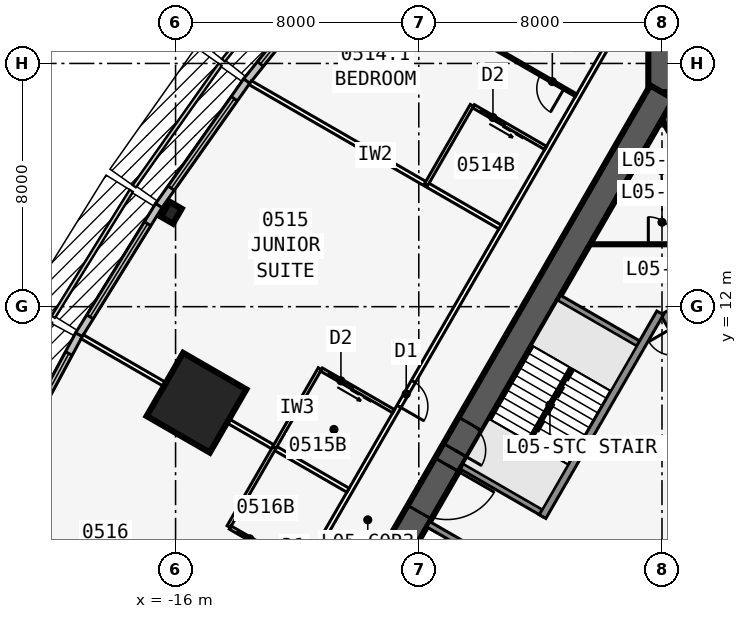
"""IFC4 building model, lengths in metres.
Left out: names, types, materials, properties, quantities, classifications, styles, units other than length and angle.
Written with IfcOpenShell. Run it as: python <this file> out.ifc"""

import sys

from ifc_helpers import new_model, si_unit, direction, frame, frame_2d, origin, origin_2d, place, context, subcontext, project, spatial, rectangle, i_section, extrude, element, fill, save


model = new_model("IFC4")
c1 = context("Model", 3, precision=1e-05, world=origin(), true_north=direction((0.0, 1.0)))
c2 = subcontext(c1, "Body", "Model", "MODEL_VIEW")
j1 = project(units=[si_unit("LENGTHUNIT", "METRE"), si_unit("PLANEANGLEUNIT", "RADIAN")], contexts=[c1])
p1 = place(None, origin())
s1 = spatial("IfcSite", under=j1, at=p1, CompositionType="ELEMENT")
p2 = place(p1, origin())
s2 = spatial("IfcBuilding", under=s1, at=p2, CompositionType="ELEMENT")
p3 = place(p2, frame((0.0, 0.0, 28.5)))
s3 = spatial("IfcBuildingStorey", under=s2, at=p3, CompositionType="ELEMENT", Elevation=28.5)
p4 = place(p3, frame((16.5, -9.526, 0.0), z_axis=(0.0, 0.0, 1.0), x_axis=(-0.499999749417, 0.866025548458, 0.0)))
e1 = element("IfcWall", 1, at=p4, inside=s3, PredefinedType="SHEAR", context=c2, shape_type="SweptSolid", body=[
    extrude(rectangle(XDim=33.0, YDim=0.9, at=frame_2d((16.5, 0.0))), origin(), (0.0, 0.0, 1.0), 3.4),
])
p5 = place(p4, frame((14.15, 0.0, 0.0)))
e2 = element("IfcOpeningElement", 2, at=p5, cuts=e1, PredefinedType="OPENING", context=c2, shape_type="SweptSolid", body=[
    extrude(rectangle(XDim=1.8, YDim=2.13, at=frame_2d((0.9, 1.065))), frame((0.0, 0.46, 0.0), z_axis=(0.0, -1.0, 0.0), x_axis=(1.0, 0.0, 0.0)), (0.0, 0.0, 1.0), 0.92),
])
p6 = place(p4, frame((12.6, 0.0, 0.0)))
e3 = element("IfcOpeningElement", 3, at=p6, cuts=e1, PredefinedType="OPENING", context=c2, shape_type="SweptSolid", body=[
    extrude(rectangle(XDim=1.0, YDim=2.13, at=frame_2d((0.5, 1.065))), frame((0.0, 0.46, 0.0), z_axis=(0.0, -1.0, 0.0), x_axis=(1.0, 0.0, 0.0)), (0.0, 0.0, 1.0), 0.92),
])
p7 = place(p3, frame((5.379, 2.586, 0.0), z_axis=(0.0, 0.0, 1.0), x_axis=(-0.500001375892, 0.866024609411, 0.0)))
e4 = element("IfcWall", 4, at=p7, inside=s3, PredefinedType="SOLIDWALL", context=c2, shape_type="SweptSolid", body=[
    extrude(rectangle(XDim=10.633, YDim=0.25, at=frame_2d((5.316, 0.0))), origin(), (0.0, 0.0, 1.0), 3.235),
])
p8 = place(p7, frame((9.164, 0.0, 0.0)))
e5 = element("IfcOpeningElement", 5, at=p8, cuts=e4, PredefinedType="OPENING", context=c2, shape_type="SweptSolid", body=[
    extrude(rectangle(XDim=0.9, YDim=2.13, at=frame_2d((0.45, 1.065))), frame((0.0, 0.135, 0.0), z_axis=(0.0, -1.0, 0.0), x_axis=(1.0, 0.0, 0.0)), (0.0, 0.0, 1.0), 0.27),
])
p9 = place(p7, frame((1.0, 0.0, 0.0)))
e6 = element("IfcOpeningElement", 6, at=p9, cuts=e4, PredefinedType="OPENING", context=c2, shape_type="SweptSolid", body=[
    extrude(rectangle(XDim=1.1, YDim=2.13, at=frame_2d((0.55, 1.065))), frame((0.0, 0.135, 0.0), z_axis=(0.0, -1.0, 0.0), x_axis=(1.0, 0.0, 0.0)), (0.0, 0.0, 1.0), 0.27),
])
p10 = place(p7, frame((3.9, 0.0, 0.0)))
e7 = element("IfcOpeningElement", 7, at=p10, cuts=e4, PredefinedType="OPENING", context=c2, shape_type="SweptSolid", body=[
    extrude(rectangle(XDim=1.1, YDim=2.13, at=frame_2d((0.55, 1.065))), frame((0.0, 0.135, 0.0), z_axis=(0.0, -1.0, 0.0), x_axis=(1.0, 0.0, 0.0)), (0.0, 0.0, 1.0), 0.27),
])
p11 = place(p7, frame((6.8, 0.0, 0.0)))
e8 = element("IfcOpeningElement", 8, at=p11, cuts=e4, PredefinedType="OPENING", context=c2, shape_type="SweptSolid", body=[
    extrude(rectangle(XDim=1.1, YDim=2.13, at=frame_2d((0.55, 1.065))), frame((0.0, 0.135, 0.0), z_axis=(0.0, -1.0, 0.0), x_axis=(1.0, 0.0, 0.0)), (0.0, 0.0, 1.0), 0.27),
])
p12 = place(p3, frame((0.0, 19.052, 0.0), z_axis=(0.0, 0.0, 1.0), x_axis=(-0.499999749417, -0.866025548458, 0.0)))
e9 = element("IfcWall", 9, at=p12, inside=s3, PredefinedType="SHEAR", context=c2, shape_type="SweptSolid", body=[
    extrude(rectangle(XDim=33.0, YDim=0.9, at=frame_2d((16.5, 0.0))), origin(), (0.0, 0.0, 1.0), 3.4),
])
p13 = place(p12, frame((14.15, 0.0, 0.0)))
e10 = element("IfcOpeningElement", 10, at=p13, cuts=e9, PredefinedType="OPENING", context=c2, shape_type="SweptSolid", body=[
    extrude(rectangle(XDim=1.8, YDim=2.13, at=frame_2d((0.9, 1.065))), frame((0.0, 0.46, 0.0), z_axis=(0.0, -1.0, 0.0), x_axis=(1.0, 0.0, 0.0)), (0.0, 0.0, 1.0), 0.92),
])
p14 = place(p12, frame((12.6, 0.0, 0.0)))
e11 = element("IfcOpeningElement", 11, at=p14, cuts=e9, PredefinedType="OPENING", context=c2, shape_type="SweptSolid", body=[
    extrude(rectangle(XDim=1.0, YDim=2.13, at=frame_2d((0.5, 1.065))), frame((0.0, 0.46, 0.0), z_axis=(0.0, -1.0, 0.0), x_axis=(1.0, 0.0, 0.0)), (0.0, 0.0, 1.0), 0.92),
])
p15 = place(p3, frame((-0.062, 11.794, 0.0), z_axis=(0.0, 0.0, 1.0), x_axis=(-0.500006680225, -0.86602154692, 0.0)))
e12 = element("IfcWall", 12, at=p15, inside=s3, PredefinedType="SOLIDWALL", context=c2, shape_type="SweptSolid", body=[
    extrude(rectangle(XDim=7.733, YDim=0.25, at=frame_2d((3.866, 0.0))), origin(), (0.0, 0.0, 1.0), 3.235),
])
for number, where, z_axis, x_axis in (
    (13, (-0.679, 10.727, 0.0), (0.0, 0.0, 1.0), (-0.866, 0.5, 0.0)),
    (14, (-3.879, 5.184, 0.0), (0.0, 0.0, 1.0), (-0.866, 0.5, 0.0)),
    (15, (-4.979, 3.279, 0.0), (0.0, 0.0, 1.0), (-0.866, 0.5, 0.0)),
):
    element("IfcWall", number, at=place(p3, frame(where, z_axis=z_axis, x_axis=x_axis)), inside=s3, PredefinedType="SOLIDWALL", context=c2, shape_type="SweptSolid", body=[
        extrude(rectangle(XDim=3.125, YDim=0.2, at=frame_2d((1.562, 0.0))), origin(), (0.0, 0.0, 1.0), 3.235),
    ])
p16 = place(p3, frame((0.0, 19.052, 0.0), z_axis=(0.0, 0.0, 1.0), x_axis=(0.0, 1.0, 0.0)))
e16 = element("IfcWall", 16, at=p16, inside=s3, PredefinedType="SHEAR", context=c2, shape_type="SweptSolid", body=[
    extrude(rectangle(XDim=4.746, YDim=0.9, at=frame_2d((2.373, 0.0))), origin(), (0.0, 0.0, 1.0), 3.4),
])
p17 = place(p16, frame((1.8, 0.0, 0.0)))
e17 = element("IfcOpeningElement", 17, at=p17, cuts=e16, PredefinedType="OPENING", context=c2, shape_type="SweptSolid", body=[
    extrude(rectangle(XDim=1.8, YDim=2.13, at=frame_2d((0.9, 1.065))), frame((0.0, 0.46, 0.0), z_axis=(0.0, -1.0, 0.0), x_axis=(1.0, 0.0, 0.0)), (0.0, 0.0, 1.0), 0.92),
])
p18 = place(p3, frame((-16.137, 15.09, 0.0), z_axis=(0.0, 0.0, 1.0), x_axis=(-0.866025403784, 0.5, 0.0)))
e18 = element("IfcColumn", 18, at=p18, inside=s3, PredefinedType="COLUMN", context=c2, shape_type="SweptSolid", body=[
    extrude(i_section(OverallWidth=0.455, OverallDepth=0.569, WebThickness=0.078, FlangeThickness=0.125, at=origin_2d()), origin(), (0.0, 0.0, 1.0), 3.4),
])
p19 = place(p3, frame((-15.312, 8.84, 0.0), z_axis=(0.0, 0.0, 1.0), x_axis=(-0.866025403784, 0.5, 0.0)))
e19 = element("IfcColumn", 19, at=p19, inside=s3, PredefinedType="COLUMN", context=c2, shape_type="SweptSolid", body=[
    extrude(rectangle(XDim=2.4, YDim=2.4, at=origin_2d()), origin(), (0.0, 0.0, 1.0), 3.4),
])
p20 = place(p3, frame((-10.505, 23.364, 0.0), z_axis=(0.0, 0.0, 1.0), x_axis=(-0.624594965756, -0.780948864364, 0.0)))
e20 = element("IfcWall", 20, at=p20, inside=s3, PredefinedType="STANDARD", context=c2, shape_type="SweptSolid", body=[
    extrude(rectangle(XDim=5.058, YDim=0.25, at=frame_2d((2.529, 0.0))), origin(), (0.0, 0.0, 1.0), 3.235),
])
p21 = place(p20, frame((0.729, 0.0, 0.45)))
e21 = element("IfcOpeningElement", 21, at=p21, cuts=e20, PredefinedType="OPENING", context=c2, shape_type="SweptSolid", body=[
    extrude(rectangle(XDim=3.6, YDim=2.4, at=frame_2d((1.8, 1.2))), frame((0.0, 0.135, 0.0), z_axis=(0.0, -1.0, 0.0), x_axis=(1.0, 0.0, 0.0)), (0.0, 0.0, 1.0), 0.27),
])
p22 = place(p3, frame((-13.659, 19.42, 0.0), z_axis=(0.0, 0.0, 1.0), x_axis=(-0.5766431066, -0.81699616132, 0.0)))
e22 = element("IfcWall", 22, at=p22, inside=s3, PredefinedType="STANDARD", context=c2, shape_type="SweptSolid", body=[
    extrude(rectangle(XDim=5.021, YDim=0.25, at=frame_2d((2.51, 0.0))), origin(), (0.0, 0.0, 1.0), 3.235),
])
p23 = place(p22, frame((0.71, 0.0, 0.45)))
e23 = element("IfcOpeningElement", 23, at=p23, cuts=e22, PredefinedType="OPENING", context=c2, shape_type="SweptSolid", body=[
    extrude(rectangle(XDim=3.6, YDim=2.4, at=frame_2d((1.8, 1.2))), frame((0.0, 0.135, 0.0), z_axis=(0.0, -1.0, 0.0), x_axis=(1.0, 0.0, 0.0)), (0.0, 0.0, 1.0), 0.27),
])
p24 = place(p3, frame((-16.551, 15.324, 0.0), z_axis=(0.0, 0.0, 1.0), x_axis=(-0.526132807704, -0.850402415717, 0.0)))
e24 = element("IfcWall", 24, at=p24, inside=s3, PredefinedType="STANDARD", context=c2, shape_type="SweptSolid", body=[
    extrude(rectangle(XDim=5.002, YDim=0.25, at=frame_2d((2.501, 0.0))), origin(), (0.0, 0.0, 1.0), 3.235),
])
p25 = place(p24, frame((0.701, 0.0, 0.45)))
e25 = element("IfcOpeningElement", 25, at=p25, cuts=e24, PredefinedType="OPENING", context=c2, shape_type="SweptSolid", body=[
    extrude(rectangle(XDim=3.6, YDim=2.4, at=frame_2d((1.8, 1.2))), frame((0.0, 0.135, 0.0), z_axis=(0.0, -1.0, 0.0), x_axis=(1.0, 0.0, 0.0)), (0.0, 0.0, 1.0), 0.27),
])
p26 = place(p3, frame((-19.178, 11.077, 0.0), z_axis=(0.0, 0.0, 1.0), x_axis=(-0.473412820489, -0.880840678782, 0.0)))
e26 = element("IfcWall", 26, at=p26, inside=s3, PredefinedType="STANDARD", context=c2, shape_type="SweptSolid", body=[
    extrude(rectangle(XDim=5.002, YDim=0.25, at=frame_2d((2.501, 0.0))), origin(), (0.0, 0.0, 1.0), 3.235),
])
p27 = place(p26, frame((0.701, 0.0, 0.45)))
e27 = element("IfcOpeningElement", 27, at=p27, cuts=e26, PredefinedType="OPENING", context=c2, shape_type="SweptSolid", body=[
    extrude(rectangle(XDim=3.6, YDim=2.4, at=frame_2d((1.8, 1.2))), frame((0.0, 0.135, 0.0), z_axis=(0.0, -1.0, 0.0), x_axis=(1.0, 0.0, 0.0)), (0.0, 0.0, 1.0), 0.27),
])
p28 = place(p3, frame((-0.5, 22.836, 0.0), z_axis=(0.0, 0.0, 1.0), x_axis=(-0.500001677587, -0.866024435227, 0.0)))
e28 = element("IfcWall", 28, at=p28, inside=s3, PredefinedType="PARTITIONING", context=c2, shape_type="SweptSolid", body=[
    extrude(rectangle(XDim=39.054, YDim=0.15, at=frame_2d((19.527, 0.0))), origin(), (0.0, 0.0, 1.0), 3.235),
])
p29 = place(p28, frame((1.558, 0.0, 0.0)))
e29 = element("IfcOpeningElement", 29, at=p29, cuts=e28, PredefinedType="OPENING", context=c2, shape_type="SweptSolid", body=[
    extrude(rectangle(XDim=0.95, YDim=2.13, at=frame_2d((0.475, 1.065))), frame((0.0, 0.085, 0.0), z_axis=(0.0, -1.0, 0.0), x_axis=(1.0, 0.0, 0.0)), (0.0, 0.0, 1.0), 0.17),
])
p30 = place(p28, frame((15.352, 0.0, 0.0)))
e30 = element("IfcOpeningElement", 30, at=p30, cuts=e28, PredefinedType="OPENING", context=c2, shape_type="SweptSolid", body=[
    extrude(rectangle(XDim=0.95, YDim=2.13, at=frame_2d((0.475, 1.065))), frame((0.0, 0.085, 0.0), z_axis=(0.0, -1.0, 0.0), x_axis=(1.0, 0.0, 0.0)), (0.0, 0.0, 1.0), 0.17),
])
p31 = place(p28, frame((22.752, 0.0, 0.0)))
e31 = element("IfcOpeningElement", 31, at=p31, cuts=e28, PredefinedType="OPENING", context=c2, shape_type="SweptSolid", body=[
    extrude(rectangle(XDim=0.95, YDim=2.13, at=frame_2d((0.475, 1.065))), frame((0.0, 0.085, 0.0), z_axis=(0.0, -1.0, 0.0), x_axis=(1.0, 0.0, 0.0)), (0.0, 0.0, 1.0), 0.17),
])
p32 = place(p28, frame((30.952, 0.0, 0.0)))
e32 = element("IfcOpeningElement", 32, at=p32, cuts=e28, PredefinedType="OPENING", context=c2, shape_type="SweptSolid", body=[
    extrude(rectangle(XDim=0.95, YDim=2.13, at=frame_2d((0.475, 1.065))), frame((0.0, 0.085, 0.0), z_axis=(0.0, -1.0, 0.0), x_axis=(1.0, 0.0, 0.0)), (0.0, 0.0, 1.0), 0.17),
])
p33 = place(p28, frame((37.752, 0.0, 0.0)))
e33 = element("IfcOpeningElement", 33, at=p33, cuts=e28, PredefinedType="OPENING", context=c2, shape_type="SweptSolid", body=[
    extrude(rectangle(XDim=0.95, YDim=2.13, at=frame_2d((0.475, 1.065))), frame((0.0, 0.085, 0.0), z_axis=(0.0, -1.0, 0.0), x_axis=(1.0, 0.0, 0.0)), (0.0, 0.0, 1.0), 0.17),
])
p34 = place(p3, frame((-2.829, 18.954, 0.0), z_axis=(0.0, 0.0, 1.0), x_axis=(-0.866020536561, 0.500008430184, 0.0)))
e34 = element("IfcWall", 34, at=p34, inside=s3, PredefinedType="PARTITIONING", context=c2, shape_type="SweptSolid", body=[
    extrude(rectangle(XDim=8.72, YDim=0.1, at=frame_2d((4.36, 0.0))), origin(), (0.0, 0.0, 1.0), 2.389),
])
p35 = place(p34, frame((0.45, 0.0, 0.0)))
e35 = element("IfcOpeningElement", 35, at=p35, cuts=e34, PredefinedType="OPENING", context=c2, shape_type="SweptSolid", body=[
    extrude(rectangle(XDim=0.9, YDim=2.13, at=frame_2d((0.45, 1.065))), frame((0.0, 0.06, 0.0), z_axis=(0.0, -1.0, 0.0), x_axis=(1.0, 0.0, 0.0)), (0.0, 0.0, 1.0), 0.12),
])
p36 = place(p3, frame((-5.329, 14.623, 0.0), z_axis=(0.0, 0.0, 1.0), x_axis=(-0.866018409083, 0.500012114982, 0.0)))
e36 = element("IfcWall", 36, at=p36, inside=s3, PredefinedType="PARTITIONING", context=c2, shape_type="SweptSolid", body=[
    extrude(rectangle(XDim=9.485, YDim=0.15, at=frame_2d((4.742, 0.0))), origin(), (0.0, 0.0, 1.0), 2.389),
])
p37 = place(p3, frame((-10.329, 5.963, 0.0), z_axis=(0.0, 0.0, 1.0), x_axis=(-0.866021688545, 0.500006434927, 0.0)))
e37 = element("IfcWall", 37, at=p37, inside=s3, PredefinedType="PARTITIONING", context=c2, shape_type="SweptSolid", body=[
    extrude(rectangle(XDim=10.096, YDim=0.15, at=frame_2d((5.048, 0.0))), origin(), (0.0, 0.0, 1.0), 2.389),
])
p38 = place(p3, frame((-6.253, 18.622, 0.0), z_axis=(0.0, 0.0, 1.0), x_axis=(-0.499990139034, -0.866031096941, 0.0)))
e38 = element("IfcWall", 38, at=p38, inside=s3, PredefinedType="PLUMBINGWALL", context=c2, shape_type="SweptSolid", body=[
    extrude(rectangle(XDim=3.0, YDim=0.12, at=frame_2d((1.5, 0.0))), origin(), (0.0, 0.0, 1.0), 3.235),
])
p39 = place(p3, frame((-3.829, 17.221, 0.0), z_axis=(0.0, 0.0, 1.0), x_axis=(-0.865997131366, 0.500048966069, 0.0)))
e39 = element("IfcWall", 39, at=p39, inside=s3, PredefinedType="PLUMBINGWALL", context=c2, shape_type="SweptSolid", body=[
    extrude(rectangle(XDim=2.74, YDim=0.12, at=frame_2d((1.37, 0.0))), origin(), (0.0, 0.0, 1.0), 3.235),
])
p40 = place(p39, frame((1.55, 0.0, 0.0)))
e40 = element("IfcOpeningElement", 40, at=p40, cuts=e39, PredefinedType="OPENING", context=c2, shape_type="SweptSolid", body=[
    extrude(rectangle(XDim=0.9, YDim=2.13, at=frame_2d((0.45, 1.065))), frame((0.0, 0.07, 0.0), z_axis=(0.0, -1.0, 0.0), x_axis=(1.0, 0.0, 0.0)), (0.0, 0.0, 1.0), 0.14),
])
p41 = place(p3, frame((-11.253, 9.961, 0.0), z_axis=(0.0, 0.0, 1.0), x_axis=(-0.499990139034, -0.866031096941, 0.0)))
e41 = element("IfcWall", 41, at=p41, inside=s3, PredefinedType="PLUMBINGWALL", context=c2, shape_type="SweptSolid", body=[
    extrude(rectangle(XDim=3.0, YDim=0.12, at=frame_2d((1.5, 0.0))), origin(), (0.0, 0.0, 1.0), 3.235),
])
p42 = place(p3, frame((-8.829, 8.561, 0.0), z_axis=(0.0, 0.0, 1.0), x_axis=(-0.866035715982, 0.499982138324, 0.0)))
e42 = element("IfcWall", 42, at=p42, inside=s3, PredefinedType="PLUMBINGWALL", context=c2, shape_type="SweptSolid", body=[
    extrude(rectangle(XDim=2.74, YDim=0.12, at=frame_2d((1.37, 0.0))), origin(), (0.0, 0.0, 1.0), 3.235),
])
p43 = place(p42, frame((1.55, 0.0, 0.0)))
e43 = element("IfcOpeningElement", 43, at=p43, cuts=e42, PredefinedType="OPENING", context=c2, shape_type="SweptSolid", body=[
    extrude(rectangle(XDim=0.9, YDim=2.13, at=frame_2d((0.45, 1.065))), frame((0.0, 0.07, 0.0), z_axis=(0.0, -1.0, 0.0), x_axis=(1.0, 0.0, 0.0)), (0.0, 0.0, 1.0), 0.14),
])
p44 = place(p3, frame((-12.753, 7.363, 0.0), z_axis=(0.0, 0.0, 1.0), x_axis=(-0.50002537861, -0.866010750942, 0.0)))
e44 = element("IfcWall", 44, at=p44, inside=s3, PredefinedType="PLUMBINGWALL", context=c2, shape_type="SweptSolid", body=[
    extrude(rectangle(XDim=3.0, YDim=0.12, at=frame_2d((1.5, 0.0))), origin(), (0.0, 0.0, 1.0), 3.235),
])
p45 = place(p3, frame((-11.829, 3.365, 0.0), z_axis=(0.0, 0.0, 1.0), x_axis=(-0.865997131366, 0.500048966069, 0.0)))
e45 = element("IfcWall", 45, at=p45, inside=s3, PredefinedType="PLUMBINGWALL", context=c2, shape_type="SweptSolid", body=[
    extrude(rectangle(XDim=2.74, YDim=0.12, at=frame_2d((1.37, 0.0))), origin(), (0.0, 0.0, 1.0), 3.235),
])
p46 = place(p45, frame((1.55, 0.0, 0.0)))
e46 = element("IfcOpeningElement", 46, at=p46, cuts=e45, PredefinedType="OPENING", context=c2, shape_type="SweptSolid", body=[
    extrude(rectangle(XDim=0.9, YDim=2.13, at=frame_2d((0.45, 1.065))), frame((0.0, 0.07, 0.0), z_axis=(0.0, -1.0, 0.0), x_axis=(1.0, 0.0, 0.0)), (0.0, 0.0, 1.0), 0.14),
])
p47 = place(p3, frame((-1.501, 15.552, 0.0), z_axis=(0.0, 0.0, 1.0), x_axis=(1.0, 0.0, 0.0)))
e47 = element("IfcWall", 47, at=p47, inside=s3, PredefinedType="SOLIDWALL", context=c2, shape_type="SweptSolid", body=[
    extrude(rectangle(XDim=3.002, YDim=0.2, at=frame_2d((1.501, 0.0))), origin(), (0.0, 0.0, 1.0), 3.235),
])
p48 = place(p3, frame((-2.367, 14.052, 0.0), z_axis=(0.0, 0.0, 1.0), x_axis=(1.0, 0.0, 0.0)))
e48 = element("IfcWall", 48, at=p48, inside=s3, PredefinedType="PARTITIONING", context=c2, shape_type="SweptSolid", body=[
    extrude(rectangle(XDim=4.734, YDim=0.1, at=frame_2d((2.367, 0.0))), origin(), (0.0, 0.0, 1.0), 3.235),
])
p49 = place(p48, frame((1.917, 0.0, 0.0)))
e49 = element("IfcOpeningElement", 49, at=p49, cuts=e48, PredefinedType="OPENING", context=c2, shape_type="SweptSolid", body=[
    extrude(rectangle(XDim=0.9, YDim=2.13, at=frame_2d((0.45, 1.065))), frame((0.0, 0.06, 0.0), z_axis=(0.0, -1.0, 0.0), x_axis=(1.0, 0.0, 0.0)), (0.0, 0.0, 1.0), 0.12),
])
p50 = place(p3, frame((-2.988, 9.978, 0.0), z_axis=(0.0, 0.0, 1.0), x_axis=(-0.499992232847, -0.866029888106, 0.0)))
e50 = element("IfcWall", 50, at=p50, inside=s3, PredefinedType="SOLIDWALL", context=c2, shape_type="SweptSolid", body=[
    extrude(rectangle(XDim=2.794, YDim=0.1, at=frame_2d((1.397, 0.0))), origin(), (0.0, 0.0, 1.0), 3.4),
])
p51 = place(p21, origin())
e51 = element("IfcWindow", 51, at=p51, inside=s3, PartitioningType="SINGLE_PANEL", PredefinedType="WINDOW", context=c2, shape_type="SweptSolid", body=[
    extrude(rectangle(XDim=3.6, YDim=2.4, at=frame_2d((1.8, 1.2))), frame((0.0, 0.03, 0.0), z_axis=(0.0, -1.0, 0.0), x_axis=(1.0, 0.0, 0.0)), (0.0, 0.0, 1.0), 0.06),
])
fill(e21, e51)
p52 = place(p23, origin())
e52 = element("IfcWindow", 52, at=p52, inside=s3, PartitioningType="SINGLE_PANEL", PredefinedType="WINDOW", context=c2, shape_type="SweptSolid", body=[
    extrude(rectangle(XDim=3.6, YDim=2.4, at=frame_2d((1.8, 1.2))), frame((0.0, 0.03, 0.0), z_axis=(0.0, -1.0, 0.0), x_axis=(1.0, 0.0, 0.0)), (0.0, 0.0, 1.0), 0.06),
])
fill(e23, e52)
p53 = place(p25, origin())
e53 = element("IfcWindow", 53, at=p53, inside=s3, PartitioningType="SINGLE_PANEL", PredefinedType="WINDOW", context=c2, shape_type="SweptSolid", body=[
    extrude(rectangle(XDim=3.6, YDim=2.4, at=frame_2d((1.8, 1.2))), frame((0.0, 0.03, 0.0), z_axis=(0.0, -1.0, 0.0), x_axis=(1.0, 0.0, 0.0)), (0.0, 0.0, 1.0), 0.06),
])
fill(e25, e53)
p54 = place(p27, origin())
e54 = element("IfcWindow", 54, at=p54, inside=s3, PartitioningType="SINGLE_PANEL", PredefinedType="WINDOW", context=c2, shape_type="SweptSolid", body=[
    extrude(rectangle(XDim=3.6, YDim=2.4, at=frame_2d((1.8, 1.2))), frame((0.0, 0.03, 0.0), z_axis=(0.0, -1.0, 0.0), x_axis=(1.0, 0.0, 0.0)), (0.0, 0.0, 1.0), 0.06),
])
fill(e27, e54)
p55 = place(p35, origin())
e55 = element("IfcDoor", 55, at=p55, inside=s3, OperationType="SINGLE_SWING_LEFT", PredefinedType="DOOR", context=c2, shape_type="SweptSolid", body=[
    extrude(rectangle(XDim=0.9, YDim=2.13, at=frame_2d((0.45, 1.065))), frame((0.0, 0.025, 0.0), z_axis=(0.0, -1.0, 0.0), x_axis=(1.0, 0.0, 0.0)), (0.0, 0.0, 1.0), 0.05),
])
fill(e35, e55)
p56 = place(p40, origin())
e56 = element("IfcDoor", 56, at=p56, inside=s3, OperationType="SLIDING_TO_LEFT", PredefinedType="DOOR", context=c2, shape_type="SweptSolid", body=[
    extrude(rectangle(XDim=0.9, YDim=2.13, at=frame_2d((0.45, 1.065))), frame((0.0, 0.025, 0.0), z_axis=(0.0, -1.0, 0.0), x_axis=(1.0, 0.0, 0.0)), (0.0, 0.0, 1.0), 0.05),
])
fill(e40, e56)
p57 = place(p43, origin())
e57 = element("IfcDoor", 57, at=p57, inside=s3, OperationType="SLIDING_TO_LEFT", PredefinedType="DOOR", context=c2, shape_type="SweptSolid", body=[
    extrude(rectangle(XDim=0.9, YDim=2.13, at=frame_2d((0.45, 1.065))), frame((0.0, 0.025, 0.0), z_axis=(0.0, -1.0, 0.0), x_axis=(1.0, 0.0, 0.0)), (0.0, 0.0, 1.0), 0.05),
])
fill(e43, e57)
p58 = place(p30, origin())
e58 = element("IfcDoor", 58, at=p58, inside=s3, OperationType="SINGLE_SWING_RIGHT", PredefinedType="DOOR", context=c2, shape_type="SweptSolid", body=[
    extrude(rectangle(XDim=0.95, YDim=2.13, at=frame_2d((0.475, 1.065))), frame((0.0, 0.025, 0.0), z_axis=(0.0, -1.0, 0.0), x_axis=(1.0, 0.0, 0.0)), (0.0, 0.0, 1.0), 0.05),
])
fill(e30, e58)
p59 = place(p46, origin())
e59 = element("IfcDoor", 59, at=p59, inside=s3, OperationType="SLIDING_TO_LEFT", PredefinedType="DOOR", context=c2, shape_type="SweptSolid", body=[
    extrude(rectangle(XDim=0.9, YDim=2.13, at=frame_2d((0.45, 1.065))), frame((0.0, 0.025, 0.0), z_axis=(0.0, -1.0, 0.0), x_axis=(1.0, 0.0, 0.0)), (0.0, 0.0, 1.0), 0.05),
])
fill(e46, e59)
p60 = place(p13, origin())
e60 = element("IfcDoor", 60, at=p60, inside=s3, OperationType="DOUBLE_DOOR_SINGLE_SWING", PredefinedType="DOOR", context=c2, shape_type="SweptSolid", body=[
    extrude(rectangle(XDim=1.8, YDim=2.13, at=frame_2d((0.9, 1.065))), frame((0.0, 0.025, 0.0), z_axis=(0.0, -1.0, 0.0), x_axis=(1.0, 0.0, 0.0)), (0.0, 0.0, 1.0), 0.05),
])
fill(e10, e60)
p61 = place(p14, origin())
e61 = element("IfcDoor", 61, at=p61, inside=s3, OperationType="SINGLE_SWING_RIGHT", PredefinedType="DOOR", context=c2, shape_type="SweptSolid", body=[
    extrude(rectangle(XDim=1.0, YDim=2.13, at=frame_2d((0.5, 1.065))), frame((0.0, 0.025, 0.0), z_axis=(0.0, -1.0, 0.0), x_axis=(1.0, 0.0, 0.0)), (0.0, 0.0, 1.0), 0.05),
])
fill(e11, e61)
p62 = place(p49, origin())
e62 = element("IfcDoor", 62, at=p62, inside=s3, OperationType="SINGLE_SWING_LEFT", PredefinedType="DOOR", context=c2, shape_type="SweptSolid", body=[
    extrude(rectangle(XDim=0.9, YDim=2.13, at=frame_2d((0.45, 1.065))), frame((0.0, 0.025, 0.0), z_axis=(0.0, -1.0, 0.0), x_axis=(1.0, 0.0, 0.0)), (0.0, 0.0, 1.0), 0.05),
])
fill(e49, e62)
save(model, sys.argv[1])
